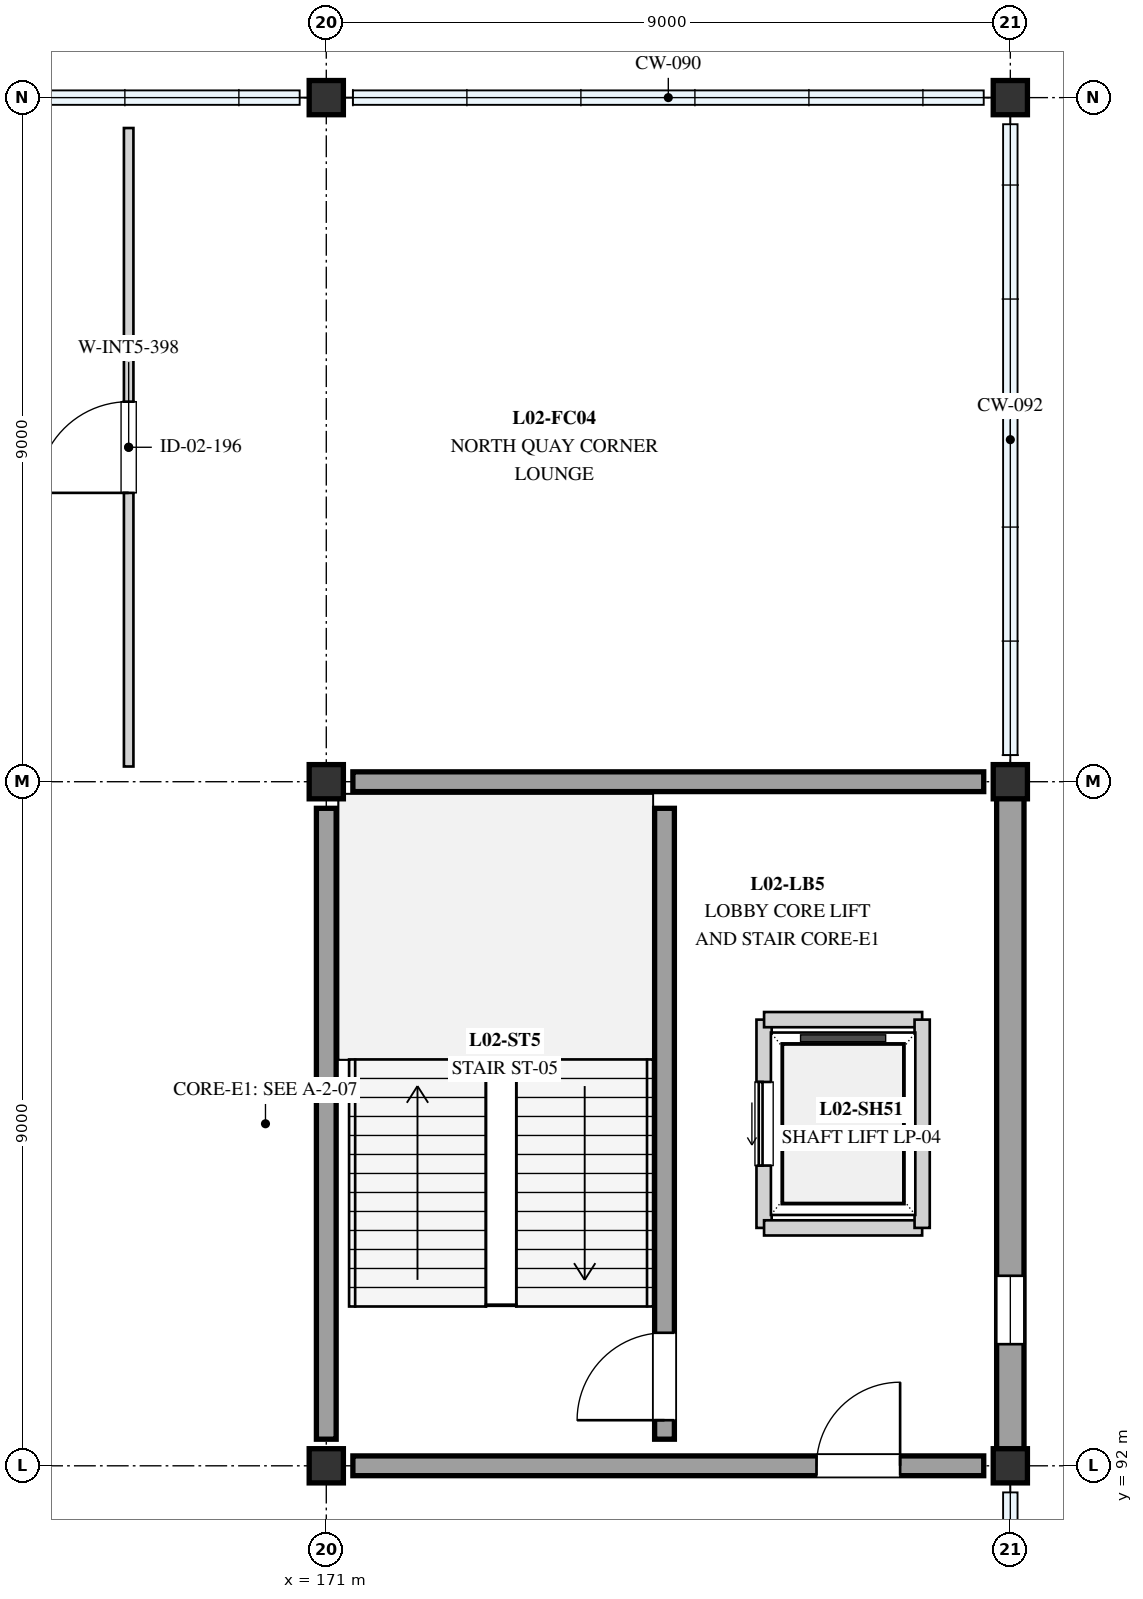
"""IFC4 building model, lengths in metres.
Left out: names, types, materials, properties, quantities, classifications, styles, units other than length and angle.
Written with IfcOpenShell. Run it as: python <this file> out.ifc"""

import sys

from ifc_helpers import new_model, si_unit, direction, frame, frame_2d, origin, origin_2d, place, context, subcontext, project, spatial, rectangle, extrude, element, fill, save


model = new_model("IFC4")
c1 = context("Model", 3, precision=1e-05, world=origin(), true_north=direction((0.0, 1.0)))
c2 = subcontext(c1, "Body", "Model", "MODEL_VIEW")
j1 = project(units=[si_unit("LENGTHUNIT", "METRE"), si_unit("PLANEANGLEUNIT", "RADIAN")], contexts=[c1])
p1 = place(None, origin())
s1 = spatial("IfcSite", under=j1, at=p1, CompositionType="ELEMENT")
p2 = place(p1, origin())
s2 = spatial("IfcBuilding", under=s1, at=p2, CompositionType="ELEMENT")
p3 = place(p2, frame((0.0, 0.0, 8.4)))
s3 = spatial("IfcBuildingStorey", under=s2, at=p3, CompositionType="ELEMENT", Elevation=8.4)
for number, where, z_axis, x_axis in (
    (1, (171.0, 92.0, 0.0), (0.0, 0.0, 1.0), (1.0, 0.0, 0.0)),
    (2, (171.0, 101.0, 0.0), (0.0, 0.0, 1.0), (1.0, 0.0, 0.0)),
):
    element("IfcColumn", number, at=place(p3, frame(where, z_axis=z_axis, x_axis=x_axis)), inside=s3, PredefinedType="COLUMN", context=c2, shape_type="SweptSolid", body=[
        extrude(rectangle(XDim=0.45, YDim=0.45, at=origin_2d()), origin(), (0.0, 0.0, 1.0), 3.6),
    ])
p4 = place(p3, frame((171.0, 110.0, 0.0), z_axis=(0.0, 0.0, 1.0), x_axis=(1.0, 0.0, 0.0)))
e3 = element("IfcColumn", 3, at=p4, inside=s3, PredefinedType="COLUMN", context=c2, shape_type="SweptSolid", body=[
    extrude(rectangle(XDim=0.45, YDim=0.45, at=origin_2d()), origin(), (0.0, 0.0, 1.0), 3.2),
])
for number, where, z_axis, x_axis in (
    (4, (180.0, 92.0, 0.0), (0.0, 0.0, 1.0), (1.0, 0.0, 0.0)),
    (5, (180.0, 101.0, 0.0), (0.0, 0.0, 1.0), (1.0, 0.0, 0.0)),
):
    element("IfcColumn", number, at=place(p3, frame(where, z_axis=z_axis, x_axis=x_axis)), inside=s3, PredefinedType="COLUMN", context=c2, shape_type="SweptSolid", body=[
        extrude(rectangle(XDim=0.45, YDim=0.45, at=origin_2d()), origin(), (0.0, 0.0, 1.0), 3.6),
    ])
p5 = place(p3, frame((180.0, 110.0, 0.0), z_axis=(0.0, 0.0, 1.0), x_axis=(1.0, 0.0, 0.0)))
e6 = element("IfcColumn", 6, at=p5, inside=s3, PredefinedType="COLUMN", context=c2, shape_type="SweptSolid", body=[
    extrude(rectangle(XDim=0.45, YDim=0.45, at=origin_2d()), origin(), (0.0, 0.0, 1.0), 3.2),
])
p6 = place(p3, frame((180.0, 101.0, 0.0), z_axis=(0.0, 0.0, 1.0), x_axis=(0.0, -1.0, 0.0)))
e7 = element("IfcWall", 7, at=p6, inside=s3, PredefinedType="STANDARD", context=c2, shape_type="SweptSolid", body=[
    extrude(rectangle(XDim=9.0, YDim=0.36, at=frame_2d((4.5, 0.0))), origin(), (0.0, 0.0, 1.0), 3.2),
])
p7 = place(p6, frame((6.5, 0.0, 0.35)))
e8 = element("IfcOpeningElement", 8, at=p7, cuts=e7, PredefinedType="OPENING", context=c2, shape_type="SweptSolid", body=[
    extrude(rectangle(XDim=0.9, YDim=1.94, at=frame_2d((0.45, 0.97))), frame((0.0, 0.19, 0.0), z_axis=(0.0, -1.0, 0.0), x_axis=(1.0, 0.0, 0.0)), (0.0, 0.0, 1.0), 0.38),
])
p8 = place(p3, frame((175.45, 92.35, 0.0), z_axis=(0.0, 0.0, 1.0), x_axis=(0.0, 1.0, 0.0)))
e9 = element("IfcWall", 9, at=p8, inside=s3, PredefinedType="SHEAR", context=c2, shape_type="SweptSolid", body=[
    extrude(rectangle(XDim=8.3, YDim=0.26, at=frame_2d((4.15, 0.0))), origin(), (0.0, 0.0, 1.0), 3.2),
])
p9 = place(p8, frame((0.25, 0.0, 0.0)))
e10 = element("IfcOpeningElement", 10, at=p9, cuts=e9, PredefinedType="OPENING", context=c2, shape_type="SweptSolid", body=[
    extrude(rectangle(XDim=1.15, YDim=2.15, at=frame_2d((0.575, 1.075))), frame((0.0, 0.14, 0.0), z_axis=(0.0, -1.0, 0.0), x_axis=(1.0, 0.0, 0.0)), (0.0, 0.0, 1.0), 0.28),
])
p10 = place(p3, frame((171.0, 92.35, 0.0), z_axis=(0.0, 0.0, 1.0), x_axis=(0.0, 1.0, 0.0)))
e11 = element("IfcWall", 11, at=p10, inside=s3, PredefinedType="SHEAR", context=c2, shape_type="SweptSolid", body=[
    extrude(rectangle(XDim=8.3, YDim=0.26, at=frame_2d((4.15, 0.0))), origin(), (0.0, 0.0, 1.0), 3.2),
])
p11 = place(p3, frame((171.35, 92.0, 0.0), z_axis=(0.0, 0.0, 1.0), x_axis=(1.0, 0.0, 0.0)))
e12 = element("IfcWall", 12, at=p11, inside=s3, PredefinedType="SHEAR", context=c2, shape_type="SweptSolid", body=[
    extrude(rectangle(XDim=8.3, YDim=0.26, at=frame_2d((4.15, 0.0))), origin(), (0.0, 0.0, 1.0), 3.2),
])
p12 = place(p11, frame((6.1, 0.0, 0.0)))
e13 = element("IfcOpeningElement", 13, at=p12, cuts=e12, PredefinedType="OPENING", context=c2, shape_type="SweptSolid", body=[
    extrude(rectangle(XDim=1.1, YDim=2.1, at=frame_2d((0.55, 1.05))), frame((0.0, 0.14, 0.0), z_axis=(0.0, -1.0, 0.0), x_axis=(1.0, 0.0, 0.0)), (0.0, 0.0, 1.0), 0.28),
])
p13 = place(p3, frame((171.35, 101.0, 0.0), z_axis=(0.0, 0.0, 1.0), x_axis=(1.0, 0.0, 0.0)))
e14 = element("IfcWall", 14, at=p13, inside=s3, PredefinedType="SHEAR", context=c2, shape_type="SweptSolid", body=[
    extrude(rectangle(XDim=8.3, YDim=0.26, at=frame_2d((4.15, 0.0))), origin(), (0.0, 0.0, 1.0), 3.2),
])
p14 = place(p3, frame((176.76, 95.13, 0.0), z_axis=(0.0, 0.0, 1.0), x_axis=(0.0, 1.0, 0.0)))
e15 = element("IfcWall", 15, at=p14, inside=s3, PredefinedType="SOLIDWALL", context=c2, shape_type="SweptSolid", body=[
    extrude(rectangle(XDim=2.74, YDim=0.2, at=frame_2d((1.37, 0.0))), origin(), (0.0, 0.0, 1.0), 2.4),
])
p15 = place(p14, frame((0.82, 0.0, 0.0)))
e16 = element("IfcOpeningElement", 16, at=p15, cuts=e15, PredefinedType="OPENING", context=c2, shape_type="SweptSolid", body=[
    extrude(rectangle(XDim=1.1, YDim=2.1, at=frame_2d((0.55, 1.05))), frame((0.0, 0.11, 0.0), z_axis=(0.0, -1.0, 0.0), x_axis=(1.0, 0.0, 0.0)), (0.0, 0.0, 1.0), 0.22),
])
for number, where, z_axis, x_axis in (
    (17, (176.76, 95.13, 0.0), (0.0, 0.0, 1.0), (1.0, 0.0, 0.0)),
    (18, (176.76, 97.87, 0.0), (0.0, 0.0, 1.0), (1.0, 0.0, 0.0)),
):
    element("IfcWall", number, at=place(p3, frame(where, z_axis=z_axis, x_axis=x_axis)), inside=s3, PredefinedType="SOLIDWALL", context=c2, shape_type="SweptSolid", body=[
        extrude(rectangle(XDim=2.08, YDim=0.2, at=frame_2d((1.04, 0.0))), origin(), (0.0, 0.0, 1.0), 2.4),
    ])
p16 = place(p3, frame((178.84, 95.13, 0.0), z_axis=(0.0, 0.0, 1.0), x_axis=(0.0, 1.0, 0.0)))
e19 = element("IfcWall", 19, at=p16, inside=s3, PredefinedType="SOLIDWALL", context=c2, shape_type="SweptSolid", body=[
    extrude(rectangle(XDim=2.74, YDim=0.2, at=frame_2d((1.37, 0.0))), origin(), (0.0, 0.0, 1.0), 2.4),
])
p17 = place(p3, frame((168.4, 101.2, 0.0), z_axis=(0.0, 0.0, 1.0), x_axis=(0.0, 1.0, 0.0)))
e20 = element("IfcWall", 20, at=p17, inside=s3, PredefinedType="PARTITIONING", context=c2, shape_type="SweptSolid", body=[
    extrude(rectangle(XDim=8.4, YDim=0.125, at=frame_2d((4.2, 0.0))), origin(), (0.0, 0.0, 1.0), 2.4),
])
p18 = place(p17, frame((3.6, 0.0, 0.0)))
e21 = element("IfcOpeningElement", 21, at=p18, cuts=e20, PredefinedType="OPENING", context=c2, shape_type="SweptSolid", body=[
    extrude(rectangle(XDim=1.2, YDim=2.15, at=frame_2d((0.6, 1.075))), frame((0.0, 0.073, 0.0), z_axis=(0.0, -1.0, 0.0), x_axis=(1.0, 0.0, 0.0)), (0.0, 0.0, 1.0), 0.145),
])
p19 = place(p7, origin())
e22 = element("IfcWindow", 22, at=p19, inside=s3, PartitioningType="SINGLE_PANEL", PredefinedType="WINDOW", context=c2, shape_type="SweptSolid", body=[
    extrude(rectangle(XDim=0.9, YDim=1.94, at=frame_2d((0.45, 0.97))), frame((0.0, 0.03, 0.0), z_axis=(0.0, -1.0, 0.0), x_axis=(1.0, 0.0, 0.0)), (0.0, 0.0, 1.0), 0.06),
])
fill(e8, e22)
p20 = place(p9, origin())
e23 = element("IfcDoor", 23, at=p20, inside=s3, OperationType="SINGLE_SWING_LEFT", PredefinedType="DOOR", context=c2, shape_type="SweptSolid", body=[
    extrude(rectangle(XDim=1.15, YDim=2.15, at=frame_2d((0.575, 1.075))), frame((0.0, 0.025, 0.0), z_axis=(0.0, -1.0, 0.0), x_axis=(1.0, 0.0, 0.0)), (0.0, 0.0, 1.0), 0.05),
])
fill(e10, e23)
p21 = place(p12, origin())
e24 = element("IfcDoor", 24, at=p21, inside=s3, OperationType="SINGLE_SWING_RIGHT", PredefinedType="DOOR", context=c2, shape_type="SweptSolid", body=[
    extrude(rectangle(XDim=1.1, YDim=2.1, at=frame_2d((0.55, 1.05))), frame((0.0, 0.025, 0.0), z_axis=(0.0, -1.0, 0.0), x_axis=(1.0, 0.0, 0.0)), (0.0, 0.0, 1.0), 0.05),
])
fill(e13, e24)
p22 = place(p15, origin())
e25 = element("IfcDoor", 25, at=p22, inside=s3, OperationType="SLIDING_TO_LEFT", PredefinedType="DOOR", context=c2, shape_type="SweptSolid", body=[
    extrude(rectangle(XDim=1.1, YDim=2.1, at=frame_2d((0.55, 1.05))), frame((0.0, 0.025, 0.0), z_axis=(0.0, -1.0, 0.0), x_axis=(1.0, 0.0, 0.0)), (0.0, 0.0, 1.0), 0.05),
])
fill(e16, e25)
p23 = place(p18, origin())
e26 = element("IfcDoor", 26, at=p23, inside=s3, OperationType="SINGLE_SWING_LEFT", PredefinedType="DOOR", context=c2, shape_type="SweptSolid", body=[
    extrude(rectangle(XDim=1.2, YDim=2.15, at=frame_2d((0.6, 1.075))), frame((0.0, 0.025, 0.0), z_axis=(0.0, -1.0, 0.0), x_axis=(1.0, 0.0, 0.0)), (0.0, 0.0, 1.0), 0.05),
])
fill(e21, e26)
save(model, sys.argv[1])
